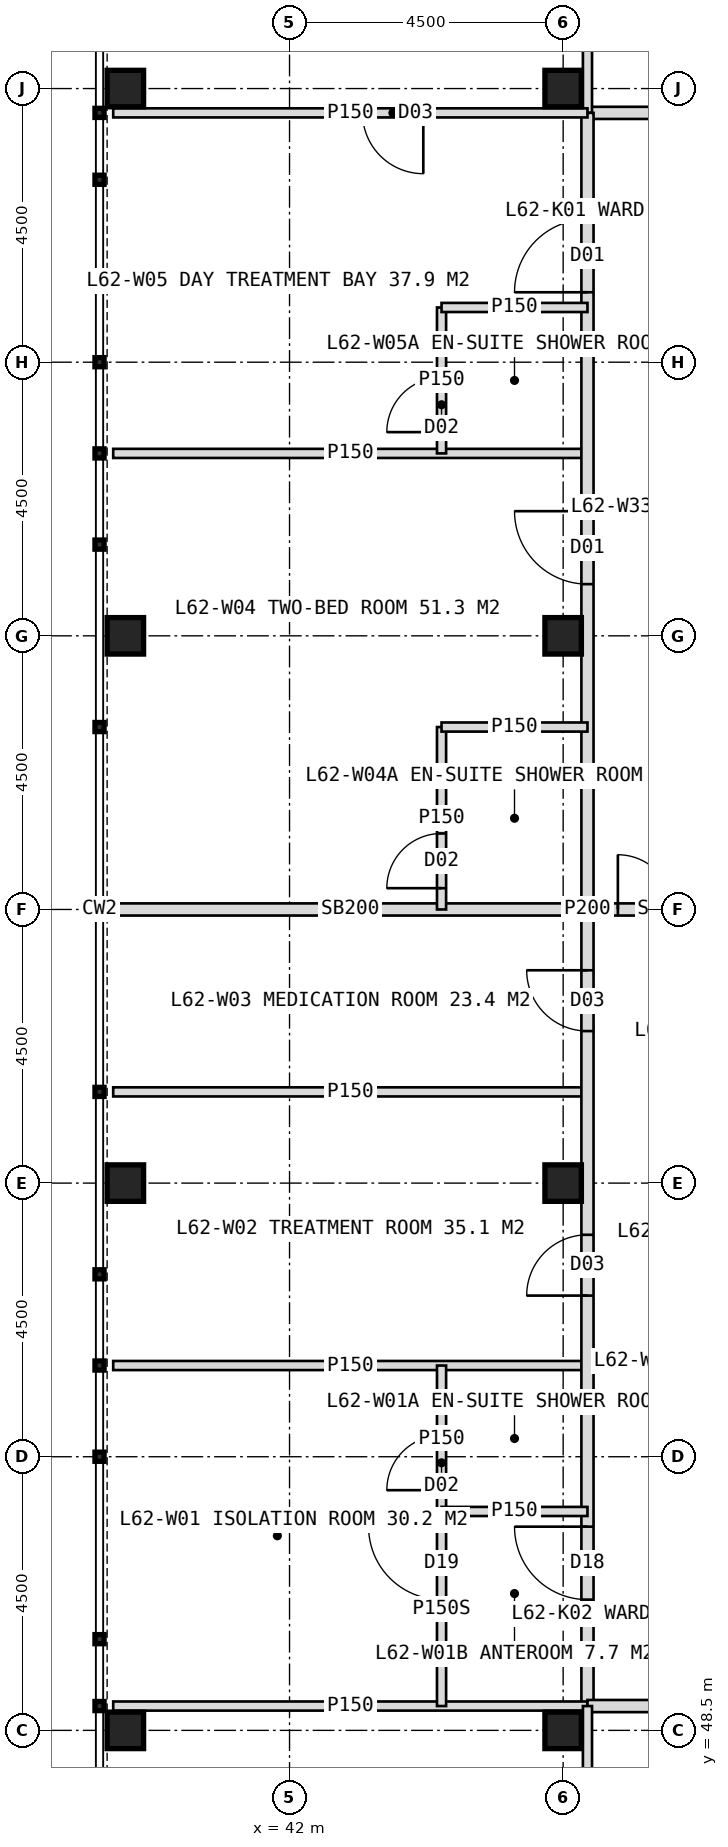
"""IFC4 building model, lengths in metres.
Left out: names, types, materials, properties, quantities, classifications, styles, units other than length and angle.
Written with IfcOpenShell. Run it as: python <this file> out.ifc"""

import sys

from ifc_helpers import new_model, si_unit, direction, frame, frame_2d, origin, origin_2d, place, context, subcontext, project, spatial, rectangle, hollow_rectangle, extrude, element, fill, save


model = new_model("IFC4")
c1 = context("Model", 3, precision=1e-05, world=origin(), true_north=direction((0.0, 1.0)))
c2 = subcontext(c1, "Body", "Model", "MODEL_VIEW")
j1 = project(units=[si_unit("LENGTHUNIT", "METRE"), si_unit("PLANEANGLEUNIT", "RADIAN")], contexts=[c1])
p1 = place(None, origin())
s1 = spatial("IfcSite", under=j1, at=p1, CompositionType="ELEMENT")
p2 = place(p1, origin())
s2 = spatial("IfcBuilding", under=s1, at=p2, CompositionType="ELEMENT")
p3 = place(p2, frame((0.0, 0.0, 258.0)))
s3 = spatial("IfcBuildingStorey", under=s2, at=p3, CompositionType="ELEMENT", Elevation=258.0)
for number, where, z_axis, x_axis in (
    (1, (46.5, 48.5, 0.0), (0.0, 0.0, 1.0), (1.0, 0.0, 0.0)),
    (2, (46.5, 75.5, 0.0), (0.0, 0.0, 1.0), (1.0, 0.0, 0.0)),
    (3, (46.5, 57.5, 0.0), (0.0, 0.0, 1.0), (1.0, 0.0, 0.0)),
    (4, (46.5, 66.5, 0.0), (0.0, 0.0, 1.0), (1.0, 0.0, 0.0)),
    (5, (39.3, 48.5, 0.0), (0.0, 0.0, 1.0), (1.0, 0.0, 0.0)),
    (6, (39.3, 57.5, 0.0), (0.0, 0.0, 1.0), (1.0, 0.0, 0.0)),
    (7, (39.3, 66.5, 0.0), (0.0, 0.0, 1.0), (1.0, 0.0, 0.0)),
    (8, (39.3, 75.5, 0.0), (0.0, 0.0, 1.0), (1.0, 0.0, 0.0)),
):
    element("IfcColumn", number, at=place(p3, frame(where, z_axis=z_axis, x_axis=x_axis)), inside=s3, PredefinedType="COLUMN", context=c2, shape_type="SweptSolid", body=[
        extrude(hollow_rectangle(XDim=0.6, YDim=0.6, WallThickness=0.04, at=origin_2d()), origin(), (0.0, 0.0, 1.0), 4.0),
    ])
p4 = place(p3, frame((46.9, 75.1, 0.0), z_axis=(0.0, 0.0, 1.0), x_axis=(1.0, 0.0, 0.0)))
e9 = element("IfcWall", 9, at=p4, inside=s3, PredefinedType="PARTITIONING", context=c2, shape_type="SweptSolid", body=[
    extrude(rectangle(XDim=26.2, YDim=0.2, at=frame_2d((13.1, 0.0))), origin(), (0.0, 0.0, 1.0), 3.75),
])
p5 = place(p4, frame((1.75, 0.0, 0.0)))
e10 = element("IfcOpeningElement", 10, at=p5, cuts=e9, PredefinedType="OPENING", context=c2, shape_type="SweptSolid", body=[
    extrude(rectangle(XDim=1.2, YDim=2.2, at=frame_2d((0.6, 1.1))), frame((0.0, 0.11, 0.0), z_axis=(0.0, -1.0, 0.0), x_axis=(1.0, 0.0, 0.0)), (0.0, 0.0, 1.0), 0.22),
])
p6 = place(p4, frame((6.75, 0.0, 0.0)))
e11 = element("IfcOpeningElement", 11, at=p6, cuts=e9, PredefinedType="OPENING", context=c2, shape_type="SweptSolid", body=[
    extrude(rectangle(XDim=1.0, YDim=2.1, at=frame_2d((0.5, 1.05))), frame((0.0, 0.11, 0.0), z_axis=(0.0, -1.0, 0.0), x_axis=(1.0, 0.0, 0.0)), (0.0, 0.0, 1.0), 0.22),
])
p7 = place(p4, frame((12.75, 0.0, 0.0)))
e12 = element("IfcOpeningElement", 12, at=p7, cuts=e9, PredefinedType="OPENING", context=c2, shape_type="SweptSolid", body=[
    extrude(rectangle(XDim=1.2, YDim=2.2, at=frame_2d((0.6, 1.1))), frame((0.0, 0.11, 0.0), z_axis=(0.0, -1.0, 0.0), x_axis=(1.0, 0.0, 0.0)), (0.0, 0.0, 1.0), 0.22),
])
p8 = place(p4, frame((20.45, 0.0, 0.0)))
e13 = element("IfcOpeningElement", 13, at=p8, cuts=e9, PredefinedType="OPENING", context=c2, shape_type="SweptSolid", body=[
    extrude(rectangle(XDim=0.9, YDim=2.1, at=frame_2d((0.45, 1.05))), frame((0.0, 0.11, 0.0), z_axis=(0.0, -1.0, 0.0), x_axis=(1.0, 0.0, 0.0)), (0.0, 0.0, 1.0), 0.22),
])
p9 = place(p4, frame((18.45, 0.0, 0.0)))
e14 = element("IfcOpeningElement", 14, at=p9, cuts=e9, PredefinedType="OPENING", context=c2, shape_type="SweptSolid", body=[
    extrude(rectangle(XDim=1.0, YDim=2.1, at=frame_2d((0.5, 1.05))), frame((0.0, 0.11, 0.0), z_axis=(0.0, -1.0, 0.0), x_axis=(1.0, 0.0, 0.0)), (0.0, 0.0, 1.0), 0.22),
])
p10 = place(p4, frame((23.65, 0.0, 0.0)))
e15 = element("IfcOpeningElement", 15, at=p10, cuts=e9, PredefinedType="OPENING", context=c2, shape_type="SweptSolid", body=[
    extrude(rectangle(XDim=1.0, YDim=2.1, at=frame_2d((0.5, 1.05))), frame((0.0, 0.11, 0.0), z_axis=(0.0, -1.0, 0.0), x_axis=(1.0, 0.0, 0.0)), (0.0, 0.0, 1.0), 0.22),
])
for number, where, z_axis, x_axis in (
    (16, (46.9, 75.1, 0.0), (0.0, 0.0, 1.0), (0.0, 1.0, 0.0)),
    (17, (46.9, 54.5, 0.0), (0.0, 0.0, 1.0), (-1.0, 0.0, 0.0)),
    (18, (46.9, 59.0, 0.0), (0.0, 0.0, 1.0), (-1.0, 0.0, 0.0)),
):
    element("IfcWall", number, at=place(p3, frame(where, z_axis=z_axis, x_axis=x_axis)), inside=s3, PredefinedType="PARTITIONING", context=c2, shape_type="SweptSolid", body=[
        extrude(rectangle(XDim=7.8, YDim=0.15, at=frame_2d((3.9, 0.0))), origin(), (0.0, 0.0, 1.0), 3.75),
    ])
p11 = place(p3, frame((46.9, 62.0, 0.0), z_axis=(0.0, 0.0, 1.0), x_axis=(-1.0, 0.0, 0.0)))
e19 = element("IfcWall", 19, at=p11, inside=s3, PredefinedType="SOLIDWALL", context=c2, shape_type="SweptSolid", body=[
    extrude(rectangle(XDim=7.8, YDim=0.2, at=frame_2d((3.9, 0.0))), origin(), (0.0, 0.0, 1.0), 2.75),
])
p12 = place(p3, frame((46.9, 69.5, 0.0), z_axis=(0.0, 0.0, 1.0), x_axis=(-1.0, 0.0, 0.0)))
e20 = element("IfcWall", 20, at=p12, inside=s3, PredefinedType="PARTITIONING", context=c2, shape_type="SweptSolid", body=[
    extrude(rectangle(XDim=7.8, YDim=0.15, at=frame_2d((3.9, 0.0))), origin(), (0.0, 0.0, 1.0), 3.75),
])
p13 = place(p3, frame((46.9, 48.9, 0.0), z_axis=(0.0, 0.0, 1.0), x_axis=(0.0, 1.0, 0.0)))
e21 = element("IfcWall", 21, at=p13, inside=s3, PredefinedType="PARTITIONING", context=c2, shape_type="SweptSolid", body=[
    extrude(rectangle(XDim=26.2, YDim=0.2, at=frame_2d((13.1, 0.0))), origin(), (0.0, 0.0, 1.0), 3.75),
])
p14 = place(p13, frame((1.75, 0.0, 0.0)))
e22 = element("IfcOpeningElement", 22, at=p14, cuts=e21, PredefinedType="OPENING", context=c2, shape_type="SweptSolid", body=[
    extrude(rectangle(XDim=1.2, YDim=2.2, at=frame_2d((0.6, 1.1))), frame((0.0, 0.11, 0.0), z_axis=(0.0, -1.0, 0.0), x_axis=(1.0, 0.0, 0.0)), (0.0, 0.0, 1.0), 0.22),
])
p15 = place(p13, frame((6.75, 0.0, 0.0)))
e23 = element("IfcOpeningElement", 23, at=p15, cuts=e21, PredefinedType="OPENING", context=c2, shape_type="SweptSolid", body=[
    extrude(rectangle(XDim=1.0, YDim=2.1, at=frame_2d((0.5, 1.05))), frame((0.0, 0.11, 0.0), z_axis=(0.0, -1.0, 0.0), x_axis=(1.0, 0.0, 0.0)), (0.0, 0.0, 1.0), 0.22),
])
p16 = place(p13, frame((11.1, 0.0, 0.0)))
e24 = element("IfcOpeningElement", 24, at=p16, cuts=e21, PredefinedType="OPENING", context=c2, shape_type="SweptSolid", body=[
    extrude(rectangle(XDim=1.0, YDim=2.1, at=frame_2d((0.5, 1.05))), frame((0.0, 0.11, 0.0), z_axis=(0.0, -1.0, 0.0), x_axis=(1.0, 0.0, 0.0)), (0.0, 0.0, 1.0), 0.22),
])
p17 = place(p13, frame((18.45, 0.0, 0.0)))
e25 = element("IfcOpeningElement", 25, at=p17, cuts=e21, PredefinedType="OPENING", context=c2, shape_type="SweptSolid", body=[
    extrude(rectangle(XDim=1.2, YDim=2.2, at=frame_2d((0.6, 1.1))), frame((0.0, 0.11, 0.0), z_axis=(0.0, -1.0, 0.0), x_axis=(1.0, 0.0, 0.0)), (0.0, 0.0, 1.0), 0.22),
])
p18 = place(p13, frame((23.25, 0.0, 0.0)))
e26 = element("IfcOpeningElement", 26, at=p18, cuts=e21, PredefinedType="OPENING", context=c2, shape_type="SweptSolid", body=[
    extrude(rectangle(XDim=1.2, YDim=2.2, at=frame_2d((0.6, 1.1))), frame((0.0, 0.11, 0.0), z_axis=(0.0, -1.0, 0.0), x_axis=(1.0, 0.0, 0.0)), (0.0, 0.0, 1.0), 0.22),
])
p19 = place(p3, frame((46.9, 48.9, 0.0), z_axis=(0.0, 0.0, 1.0), x_axis=(-1.0, 0.0, 0.0)))
e27 = element("IfcWall", 27, at=p19, inside=s3, PredefinedType="PARTITIONING", context=c2, shape_type="SweptSolid", body=[
    extrude(rectangle(XDim=7.8, YDim=0.15, at=frame_2d((3.9, 0.0))), origin(), (0.0, 0.0, 1.0), 3.75),
])
p20 = place(p3, frame((44.5, 52.1, 0.0), z_axis=(0.0, 0.0, 1.0), x_axis=(0.0, 1.0, 0.0)))
e28 = element("IfcWall", 28, at=p20, inside=s3, PredefinedType="PARTITIONING", context=c2, shape_type="SweptSolid", body=[
    extrude(rectangle(XDim=2.4, YDim=0.15, at=frame_2d((1.2, 0.0))), origin(), (0.0, 0.0, 1.0), 3.75),
])
p21 = place(p20, frame((0.35, 0.0, 0.0)))
e29 = element("IfcOpeningElement", 29, at=p21, cuts=e28, PredefinedType="OPENING", context=c2, shape_type="SweptSolid", body=[
    extrude(rectangle(XDim=0.9, YDim=2.1, at=frame_2d((0.45, 1.05))), frame((0.0, 0.085, 0.0), z_axis=(0.0, -1.0, 0.0), x_axis=(1.0, 0.0, 0.0)), (0.0, 0.0, 1.0), 0.17),
])
p22 = place(p3, frame((46.9, 52.1, 0.0), z_axis=(0.0, 0.0, 1.0), x_axis=(-1.0, 0.0, 0.0)))
e30 = element("IfcWall", 30, at=p22, inside=s3, PredefinedType="PARTITIONING", context=c2, shape_type="SweptSolid", body=[
    extrude(rectangle(XDim=2.4, YDim=0.15, at=frame_2d((1.2, 0.0))), origin(), (0.0, 0.0, 1.0), 3.75),
])
p23 = place(p3, frame((44.5, 48.9, 0.0), z_axis=(0.0, 0.0, 1.0), x_axis=(0.0, 1.0, 0.0)))
e31 = element("IfcWall", 31, at=p23, inside=s3, PredefinedType="PARTITIONING", context=c2, shape_type="SweptSolid", body=[
    extrude(rectangle(XDim=3.2, YDim=0.15, at=frame_2d((1.6, 0.0))), origin(), (0.0, 0.0, 1.0), 3.75),
])
p24 = place(p23, frame((1.75, 0.0, 0.0)))
e32 = element("IfcOpeningElement", 32, at=p24, cuts=e31, PredefinedType="OPENING", context=c2, shape_type="SweptSolid", body=[
    extrude(rectangle(XDim=1.2, YDim=2.2, at=frame_2d((0.6, 1.1))), frame((0.0, 0.085, 0.0), z_axis=(0.0, -1.0, 0.0), x_axis=(1.0, 0.0, 0.0)), (0.0, 0.0, 1.0), 0.17),
])
p25 = place(p3, frame((44.5, 62.0, 0.0), z_axis=(0.0, 0.0, 1.0), x_axis=(0.0, 1.0, 0.0)))
e33 = element("IfcWall", 33, at=p25, inside=s3, PredefinedType="PARTITIONING", context=c2, shape_type="SweptSolid", body=[
    extrude(rectangle(XDim=3.0, YDim=0.15, at=frame_2d((1.5, 0.0))), origin(), (0.0, 0.0, 1.0), 3.75),
])
p26 = place(p25, frame((0.35, 0.0, 0.0)))
e34 = element("IfcOpeningElement", 34, at=p26, cuts=e33, PredefinedType="OPENING", context=c2, shape_type="SweptSolid", body=[
    extrude(rectangle(XDim=0.9, YDim=2.1, at=frame_2d((0.45, 1.05))), frame((0.0, 0.085, 0.0), z_axis=(0.0, -1.0, 0.0), x_axis=(1.0, 0.0, 0.0)), (0.0, 0.0, 1.0), 0.17),
])
p27 = place(p3, frame((46.9, 65.0, 0.0), z_axis=(0.0, 0.0, 1.0), x_axis=(-1.0, 0.0, 0.0)))
e35 = element("IfcWall", 35, at=p27, inside=s3, PredefinedType="PARTITIONING", context=c2, shape_type="SweptSolid", body=[
    extrude(rectangle(XDim=2.4, YDim=0.15, at=frame_2d((1.2, 0.0))), origin(), (0.0, 0.0, 1.0), 3.75),
])
p28 = place(p3, frame((46.9, 75.1, 0.0), z_axis=(0.0, 0.0, 1.0), x_axis=(-1.0, 0.0, 0.0)))
e36 = element("IfcWall", 36, at=p28, inside=s3, PredefinedType="PARTITIONING", context=c2, shape_type="SweptSolid", body=[
    extrude(rectangle(XDim=7.8, YDim=0.15, at=frame_2d((3.9, 0.0))), origin(), (0.0, 0.0, 1.0), 3.75),
])
p29 = place(p28, frame((2.7, 0.0, 0.0)))
e37 = element("IfcOpeningElement", 37, at=p29, cuts=e36, PredefinedType="OPENING", context=c2, shape_type="SweptSolid", body=[
    extrude(rectangle(XDim=1.0, YDim=2.1, at=frame_2d((0.5, 1.05))), frame((0.0, 0.085, 0.0), z_axis=(0.0, -1.0, 0.0), x_axis=(1.0, 0.0, 0.0)), (0.0, 0.0, 1.0), 0.17),
])
p30 = place(p3, frame((44.5, 69.5, 0.0), z_axis=(0.0, 0.0, 1.0), x_axis=(0.0, 1.0, 0.0)))
e38 = element("IfcWall", 38, at=p30, inside=s3, PredefinedType="PARTITIONING", context=c2, shape_type="SweptSolid", body=[
    extrude(rectangle(XDim=2.4, YDim=0.15, at=frame_2d((1.2, 0.0))), origin(), (0.0, 0.0, 1.0), 3.75),
])
p31 = place(p30, frame((0.35, 0.0, 0.0)))
e39 = element("IfcOpeningElement", 39, at=p31, cuts=e38, PredefinedType="OPENING", context=c2, shape_type="SweptSolid", body=[
    extrude(rectangle(XDim=0.9, YDim=2.1, at=frame_2d((0.45, 1.05))), frame((0.0, 0.085, 0.0), z_axis=(0.0, -1.0, 0.0), x_axis=(1.0, 0.0, 0.0)), (0.0, 0.0, 1.0), 0.17),
])
p32 = place(p3, frame((46.9, 71.9, 0.0), z_axis=(0.0, 0.0, 1.0), x_axis=(-1.0, 0.0, 0.0)))
e40 = element("IfcWall", 40, at=p32, inside=s3, PredefinedType="PARTITIONING", context=c2, shape_type="SweptSolid", body=[
    extrude(rectangle(XDim=2.4, YDim=0.15, at=frame_2d((1.2, 0.0))), origin(), (0.0, 0.0, 1.0), 3.75),
])
p33 = place(p3, frame((73.1, 48.9, 0.0), z_axis=(0.0, 0.0, 1.0), x_axis=(-1.0, 0.0, 0.0)))
e41 = element("IfcWall", 41, at=p33, inside=s3, PredefinedType="PARTITIONING", context=c2, shape_type="SweptSolid", body=[
    extrude(rectangle(XDim=26.2, YDim=0.2, at=frame_2d((13.1, 0.0))), origin(), (0.0, 0.0, 1.0), 3.75),
])
p34 = place(p33, frame((1.75, 0.0, 0.0)))
e42 = element("IfcOpeningElement", 42, at=p34, cuts=e41, PredefinedType="OPENING", context=c2, shape_type="SweptSolid", body=[
    extrude(rectangle(XDim=1.2, YDim=2.2, at=frame_2d((0.6, 1.1))), frame((0.0, 0.11, 0.0), z_axis=(0.0, -1.0, 0.0), x_axis=(1.0, 0.0, 0.0)), (0.0, 0.0, 1.0), 0.22),
])
p35 = place(p33, frame((6.75, 0.0, 0.0)))
e43 = element("IfcOpeningElement", 43, at=p35, cuts=e41, PredefinedType="OPENING", context=c2, shape_type="SweptSolid", body=[
    extrude(rectangle(XDim=1.0, YDim=2.1, at=frame_2d((0.5, 1.05))), frame((0.0, 0.11, 0.0), z_axis=(0.0, -1.0, 0.0), x_axis=(1.0, 0.0, 0.0)), (0.0, 0.0, 1.0), 0.22),
])
p36 = place(p33, frame((11.1, 0.0, 0.0)))
e44 = element("IfcOpeningElement", 44, at=p36, cuts=e41, PredefinedType="OPENING", context=c2, shape_type="SweptSolid", body=[
    extrude(rectangle(XDim=1.0, YDim=2.1, at=frame_2d((0.5, 1.05))), frame((0.0, 0.11, 0.0), z_axis=(0.0, -1.0, 0.0), x_axis=(1.0, 0.0, 0.0)), (0.0, 0.0, 1.0), 0.22),
])
p37 = place(p33, frame((14.1, 0.0, 0.0)))
e45 = element("IfcOpeningElement", 45, at=p37, cuts=e41, PredefinedType="OPENING", context=c2, shape_type="SweptSolid", body=[
    extrude(rectangle(XDim=1.0, YDim=2.1, at=frame_2d((0.5, 1.05))), frame((0.0, 0.11, 0.0), z_axis=(0.0, -1.0, 0.0), x_axis=(1.0, 0.0, 0.0)), (0.0, 0.0, 1.0), 0.22),
])
p38 = place(p33, frame((18.45, 0.0, 0.0)))
e46 = element("IfcOpeningElement", 46, at=p38, cuts=e41, PredefinedType="OPENING", context=c2, shape_type="SweptSolid", body=[
    extrude(rectangle(XDim=1.0, YDim=2.1, at=frame_2d((0.5, 1.05))), frame((0.0, 0.11, 0.0), z_axis=(0.0, -1.0, 0.0), x_axis=(1.0, 0.0, 0.0)), (0.0, 0.0, 1.0), 0.22),
])
p39 = place(p33, frame((22.9, 0.0, 0.0)))
e47 = element("IfcOpeningElement", 47, at=p39, cuts=e41, PredefinedType="OPENING", context=c2, shape_type="SweptSolid", body=[
    extrude(rectangle(XDim=1.0, YDim=2.1, at=frame_2d((0.5, 1.05))), frame((0.0, 0.11, 0.0), z_axis=(0.0, -1.0, 0.0), x_axis=(1.0, 0.0, 0.0)), (0.0, 0.0, 1.0), 0.22),
])
p40 = place(p3, frame((46.9, 48.9, 0.0), z_axis=(0.0, 0.0, 1.0), x_axis=(0.0, -1.0, 0.0)))
e48 = element("IfcWall", 48, at=p40, inside=s3, PredefinedType="PARTITIONING", context=c2, shape_type="SweptSolid", body=[
    extrude(rectangle(XDim=7.8, YDim=0.15, at=frame_2d((3.9, 0.0))), origin(), (0.0, 0.0, 1.0), 3.75),
])
p41 = place(p40, frame((2.7, 0.0, 0.0)))
e49 = element("IfcOpeningElement", 49, at=p41, cuts=e48, PredefinedType="OPENING", context=c2, shape_type="SweptSolid", body=[
    extrude(rectangle(XDim=1.0, YDim=2.1, at=frame_2d((0.5, 1.05))), frame((0.0, 0.085, 0.0), z_axis=(0.0, -1.0, 0.0), x_axis=(1.0, 0.0, 0.0)), (0.0, 0.0, 1.0), 0.17),
])
p42 = place(p3, frame((49.5, 62.0, 0.0), z_axis=(0.0, 0.0, 1.0), x_axis=(-1.0, 0.0, 0.0)))
e50 = element("IfcWall", 50, at=p42, inside=s3, PredefinedType="SOLIDWALL", context=c2, shape_type="SweptSolid", body=[
    extrude(rectangle(XDim=2.6, YDim=0.2, at=frame_2d((1.3, 0.0))), origin(), (0.0, 0.0, 1.0), 2.75),
])
p43 = place(p42, frame((0.3, 0.0, 0.0)))
e51 = element("IfcOpeningElement", 51, at=p43, cuts=e50, PredefinedType="OPENING", context=c2, shape_type="SweptSolid", body=[
    extrude(rectangle(XDim=1.8, YDim=2.2, at=frame_2d((0.9, 1.1))), frame((0.0, 0.11, 0.0), z_axis=(0.0, -1.0, 0.0), x_axis=(1.0, 0.0, 0.0)), (0.0, 0.0, 1.0), 0.22),
])
p44 = place(p24, origin())
e52 = element("IfcDoor", 52, at=p44, inside=s3, OperationType="SINGLE_SWING_RIGHT", PredefinedType="DOOR", context=c2, shape_type="SweptSolid", body=[
    extrude(rectangle(XDim=1.2, YDim=2.2, at=frame_2d((0.6, 1.1))), frame((0.0, 0.025, 0.0), z_axis=(0.0, -1.0, 0.0), x_axis=(1.0, 0.0, 0.0)), (0.0, 0.0, 1.0), 0.05),
])
fill(e32, e52)
p45 = place(p14, origin())
e53 = element("IfcDoor", 53, at=p45, inside=s3, OperationType="SINGLE_SWING_RIGHT", PredefinedType="DOOR", context=c2, shape_type="SweptSolid", body=[
    extrude(rectangle(XDim=1.2, YDim=2.2, at=frame_2d((0.6, 1.1))), frame((0.0, 0.025, 0.0), z_axis=(0.0, -1.0, 0.0), x_axis=(1.0, 0.0, 0.0)), (0.0, 0.0, 1.0), 0.05),
])
fill(e22, e53)
p46 = place(p21, origin())
e54 = element("IfcDoor", 54, at=p46, inside=s3, OperationType="SINGLE_SWING_LEFT", PredefinedType="DOOR", context=c2, shape_type="SweptSolid", body=[
    extrude(rectangle(XDim=0.9, YDim=2.1, at=frame_2d((0.45, 1.05))), frame((0.0, 0.025, 0.0), z_axis=(0.0, -1.0, 0.0), x_axis=(1.0, 0.0, 0.0)), (0.0, 0.0, 1.0), 0.05),
])
fill(e29, e54)
p47 = place(p15, origin())
e55 = element("IfcDoor", 55, at=p47, inside=s3, OperationType="SINGLE_SWING_LEFT", PredefinedType="DOOR", context=c2, shape_type="SweptSolid", body=[
    extrude(rectangle(XDim=1.0, YDim=2.1, at=frame_2d((0.5, 1.05))), frame((0.0, 0.025, 0.0), z_axis=(0.0, -1.0, 0.0), x_axis=(1.0, 0.0, 0.0)), (0.0, 0.0, 1.0), 0.05),
])
fill(e23, e55)
p48 = place(p16, origin())
e56 = element("IfcDoor", 56, at=p48, inside=s3, OperationType="SINGLE_SWING_RIGHT", PredefinedType="DOOR", context=c2, shape_type="SweptSolid", body=[
    extrude(rectangle(XDim=1.0, YDim=2.1, at=frame_2d((0.5, 1.05))), frame((0.0, 0.025, 0.0), z_axis=(0.0, -1.0, 0.0), x_axis=(1.0, 0.0, 0.0)), (0.0, 0.0, 1.0), 0.05),
])
fill(e24, e56)
p49 = place(p17, origin())
e57 = element("IfcDoor", 57, at=p49, inside=s3, OperationType="SINGLE_SWING_RIGHT", PredefinedType="DOOR", context=c2, shape_type="SweptSolid", body=[
    extrude(rectangle(XDim=1.2, YDim=2.2, at=frame_2d((0.6, 1.1))), frame((0.0, 0.025, 0.0), z_axis=(0.0, -1.0, 0.0), x_axis=(1.0, 0.0, 0.0)), (0.0, 0.0, 1.0), 0.05),
])
fill(e25, e57)
p50 = place(p26, origin())
e58 = element("IfcDoor", 58, at=p50, inside=s3, OperationType="SINGLE_SWING_LEFT", PredefinedType="DOOR", context=c2, shape_type="SweptSolid", body=[
    extrude(rectangle(XDim=0.9, YDim=2.1, at=frame_2d((0.45, 1.05))), frame((0.0, 0.025, 0.0), z_axis=(0.0, -1.0, 0.0), x_axis=(1.0, 0.0, 0.0)), (0.0, 0.0, 1.0), 0.05),
])
fill(e34, e58)
p51 = place(p29, origin())
e59 = element("IfcDoor", 59, at=p51, inside=s3, OperationType="SINGLE_SWING_LEFT", PredefinedType="DOOR", context=c2, shape_type="SweptSolid", body=[
    extrude(rectangle(XDim=1.0, YDim=2.1, at=frame_2d((0.5, 1.05))), frame((0.0, 0.025, 0.0), z_axis=(0.0, -1.0, 0.0), x_axis=(1.0, 0.0, 0.0)), (0.0, 0.0, 1.0), 0.05),
])
fill(e37, e59)
p52 = place(p18, origin())
e60 = element("IfcDoor", 60, at=p52, inside=s3, OperationType="SINGLE_SWING_LEFT", PredefinedType="DOOR", context=c2, shape_type="SweptSolid", body=[
    extrude(rectangle(XDim=1.2, YDim=2.2, at=frame_2d((0.6, 1.1))), frame((0.0, 0.025, 0.0), z_axis=(0.0, -1.0, 0.0), x_axis=(1.0, 0.0, 0.0)), (0.0, 0.0, 1.0), 0.05),
])
fill(e26, e60)
p53 = place(p31, origin())
e61 = element("IfcDoor", 61, at=p53, inside=s3, OperationType="SINGLE_SWING_LEFT", PredefinedType="DOOR", context=c2, shape_type="SweptSolid", body=[
    extrude(rectangle(XDim=0.9, YDim=2.1, at=frame_2d((0.45, 1.05))), frame((0.0, 0.025, 0.0), z_axis=(0.0, -1.0, 0.0), x_axis=(1.0, 0.0, 0.0)), (0.0, 0.0, 1.0), 0.05),
])
fill(e39, e61)
p54 = place(p43, origin())
e62 = element("IfcDoor", 62, at=p54, inside=s3, OperationType="DOUBLE_DOOR_DOUBLE_SWING", PredefinedType="DOOR", context=c2, shape_type="SweptSolid", body=[
    extrude(rectangle(XDim=1.8, YDim=2.2, at=frame_2d((0.9, 1.1))), frame((0.0, 0.025, 0.0), z_axis=(0.0, -1.0, 0.0), x_axis=(1.0, 0.0, 0.0)), (0.0, 0.0, 1.0), 0.05),
])
fill(e51, e62)
save(model, sys.argv[1])
